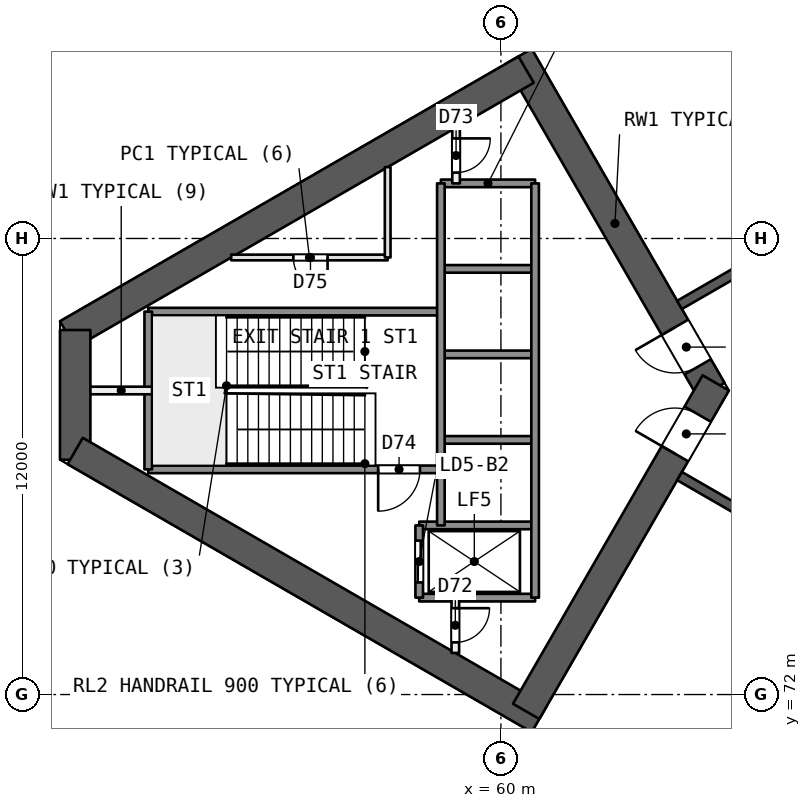
"""IFC4 building model, lengths in metres.
Left out: names, types, materials, properties, quantities, classifications, styles, units other than length and angle.
Written with IfcOpenShell. Run it as: python <this file> out.ifc"""

import sys

from ifc_helpers import new_model, si_unit, direction, frame, frame_2d, origin, place, context, subcontext, project, spatial, rectangle, extrude, element, fill, save


model = new_model("IFC4")
c1 = context("Model", 3, precision=1e-05, world=origin(), true_north=direction((0.0, 1.0)))
c2 = subcontext(c1, "Body", "Model", "MODEL_VIEW")
j1 = project(units=[si_unit("LENGTHUNIT", "METRE"), si_unit("PLANEANGLEUNIT", "RADIAN")], contexts=[c1])
p1 = place(None, origin())
s1 = spatial("IfcSite", under=j1, at=p1, CompositionType="ELEMENT")
p2 = place(p1, origin())
s2 = spatial("IfcBuilding", under=s1, at=p2, CompositionType="ELEMENT")
p3 = place(p2, frame((0.0, 0.0, -9.0)))
s3 = spatial("IfcBuildingStorey", under=s2, at=p3, CompositionType="ELEMENT", Elevation=-9.0)
p4 = place(p3, frame((94.84, 122.4, -0.3), z_axis=(0.0, 0.0, 1.0), x_axis=(-0.866026157749, -0.499998694092, 0.0)))
e1 = element("IfcWall", 1, at=p4, inside=s3, PredefinedType="SOLIDWALL", context=c2, shape_type="SweptSolid", body=[
    extrude(rectangle(XDim=76.937, YDim=0.6, at=frame_2d((38.469, 0.0))), origin(), (0.0, 0.0, 1.0), 4.8),
])
p5 = place(p3, frame((28.36, 75.981, -0.3), z_axis=(0.0, 0.0, 1.0), x_axis=(0.866025364439, -0.500000068148, 0.0)))
e2 = element("IfcWall", 2, at=p5, inside=s3, PredefinedType="SOLIDWALL", context=c2, shape_type="SweptSolid", body=[
    extrude(rectangle(XDim=76.937, YDim=0.6, at=frame_2d((38.469, 0.0))), origin(), (0.0, 0.0, 1.0), 4.8),
])
p6 = place(p3, frame((65.538, 80.0, -0.3), z_axis=(0.0, 0.0, 1.0), x_axis=(-0.49999662545, 0.866027352073, 0.0)))
e3 = element("IfcWall", 3, at=p6, inside=s3, PredefinedType="SHEAR", context=c2, shape_type="SweptSolid", body=[
    extrude(rectangle(XDim=10.149, YDim=0.8, at=frame_2d((5.074, 0.0))), origin(), (0.0, 0.0, 1.0), 4.8),
])
p7 = place(p6, frame((0.719, 0.0, 0.3)))
e4 = element("IfcOpeningElement", 4, at=p7, cuts=e3, PredefinedType="OPENING", context=c2, shape_type="SweptSolid", body=[
    extrude(rectangle(XDim=1.2, YDim=2.1, at=frame_2d((0.6, 1.05))), frame((0.0, 0.411, 0.0), z_axis=(0.0, -1.0, 0.0), x_axis=(1.0, 0.0, 0.0)), (0.0, 0.0, 1.0), 0.821),
])
p8 = place(p3, frame((60.664, 88.443, -0.3), z_axis=(0.0, 0.0, 1.0), x_axis=(-0.866029478545, -0.499992942241, 0.0)))
e5 = element("IfcWall", 5, at=p8, inside=s3, PredefinedType="SHEAR", context=c2, shape_type="SweptSolid", body=[
    extrude(rectangle(XDim=13.933, YDim=0.8, at=frame_2d((6.967, 0.0))), origin(), (0.0, 0.0, 1.0), 4.8),
])
p9 = place(p3, frame((48.797, 81.592, -0.3), z_axis=(0.0, 0.0, 1.0), x_axis=(0.0, -1.0, 0.0)))
e6 = element("IfcWall", 6, at=p9, inside=s3, PredefinedType="SHEAR", context=c2, shape_type="SweptSolid", body=[
    extrude(rectangle(XDim=3.415, YDim=0.8, at=frame_2d((1.707, 0.0))), origin(), (0.0, 0.0, 1.0), 4.8),
])
p10 = place(p3, frame((48.797, 78.408, -0.3), z_axis=(0.0, 0.0, 1.0), x_axis=(0.866032504327, -0.499987701298, 0.0)))
e7 = element("IfcWall", 7, at=p10, inside=s3, PredefinedType="SHEAR", context=c2, shape_type="SweptSolid", body=[
    extrude(rectangle(XDim=14.102, YDim=0.8, at=frame_2d((7.051, 0.0))), origin(), (0.0, 0.0, 1.0), 4.8),
])
p11 = place(p3, frame((60.664, 71.557, -0.3), z_axis=(0.0, 0.0, 1.0), x_axis=(0.50000409368, 0.866023040284, 0.0)))
e8 = element("IfcWall", 8, at=p11, inside=s3, PredefinedType="SHEAR", context=c2, shape_type="SweptSolid", body=[
    extrude(rectangle(XDim=9.98, YDim=0.8, at=frame_2d((4.99, 0.0))), origin(), (0.0, 0.0, 1.0), 4.8),
])
p12 = place(p11, frame((7.83, 0.0, 0.3)))
e9 = element("IfcOpeningElement", 9, at=p12, cuts=e8, PredefinedType="OPENING", context=c2, shape_type="SweptSolid", body=[
    extrude(rectangle(XDim=1.2, YDim=2.1, at=frame_2d((0.6, 1.05))), frame((0.0, 0.411, 0.0), z_axis=(0.0, -1.0, 0.0), x_axis=(1.0, 0.0, 0.0)), (0.0, 0.0, 1.0), 0.821),
])
for number, where, z_axis, x_axis in (
    (10, (78.2, 90.046, -0.3), (0.0, 0.0, 1.0), (-0.866, -0.5, 0.0)),
    (11, (64.7, 77.748, -0.3), (0.0, 0.0, 1.0), (0.866, -0.5, 0.0)),
):
    element("IfcWall", number, at=place(p3, frame(where, z_axis=z_axis, x_axis=x_axis)), inside=s3, PredefinedType="SHEAR", context=c2, shape_type="SweptSolid", body=[
        extrude(rectangle(XDim=15.588, YDim=0.25, at=frame_2d((7.794, 0.0))), origin(), (0.0, 0.0, 1.0), 4.5),
    ])
p13 = place(p3, frame((60.9, 85.45, 0.0), z_axis=(0.0, 0.0, 1.0), x_axis=(-1.0, 0.0, 0.0)))
e12 = element("IfcWall", 12, at=p13, inside=s3, PredefinedType="SOLIDWALL", context=c2, shape_type="SweptSolid", body=[
    extrude(rectangle(XDim=2.48, YDim=0.2, at=frame_2d((1.24, 0.0))), origin(), (0.0, 0.0, 1.0), 4.2),
])
p14 = place(p3, frame((57.02, 83.5, 0.0), z_axis=(0.0, 0.0, 1.0), x_axis=(-1.0, 0.0, 0.0)))
e13 = element("IfcWall", 13, at=p14, inside=s3, PredefinedType="PARTITIONING", context=c2, shape_type="SweptSolid", body=[
    extrude(rectangle(XDim=4.118, YDim=0.15, at=frame_2d((2.059, 0.0))), origin(), (0.0, 0.0, 1.0), 4.2),
])
p15 = place(p14, frame((1.582, 0.0, 0.0)))
e14 = element("IfcOpeningElement", 14, at=p15, cuts=e13, PredefinedType="OPENING", context=c2, shape_type="SweptSolid", body=[
    extrude(rectangle(XDim=0.9, YDim=2.1, at=frame_2d((0.45, 1.05))), frame((0.0, 0.085, 0.0), z_axis=(0.0, -1.0, 0.0), x_axis=(1.0, 0.0, 0.0)), (0.0, 0.0, 1.0), 0.171),
])
p16 = place(p3, frame((60.9, 83.2, 0.0), z_axis=(0.0, 0.0, 1.0), x_axis=(-1.0, 0.0, 0.0)))
e15 = element("IfcWall", 15, at=p16, inside=s3, PredefinedType="SOLIDWALL", context=c2, shape_type="SweptSolid", body=[
    extrude(rectangle(XDim=2.48, YDim=0.2, at=frame_2d((1.24, 0.0))), origin(), (0.0, 0.0, 1.0), 4.2),
])
p17 = place(p3, frame((58.42, 82.075, 0.0), z_axis=(0.0, 0.0, 1.0), x_axis=(-1.0, 0.0, 0.0)))
e16 = element("IfcWall", 16, at=p17, inside=s3, PredefinedType="SOLIDWALL", context=c2, shape_type="SweptSolid", body=[
    extrude(rectangle(XDim=7.7, YDim=0.2, at=frame_2d((3.85, 0.0))), origin(), (0.0, 0.0, 1.0), 4.2),
])
p18 = place(p3, frame((60.9, 80.95, 0.0), z_axis=(0.0, 0.0, 1.0), x_axis=(-1.0, 0.0, 0.0)))
e17 = element("IfcWall", 17, at=p18, inside=s3, PredefinedType="SOLIDWALL", context=c2, shape_type="SweptSolid", body=[
    extrude(rectangle(XDim=2.48, YDim=0.2, at=frame_2d((1.24, 0.0))), origin(), (0.0, 0.0, 1.0), 4.2),
])
p19 = place(p3, frame((50.82, 80.0, 0.0), z_axis=(0.0, 0.0, 1.0), x_axis=(-1.0, 0.0, 0.0)))
e18 = element("IfcWall", 18, at=p19, inside=s3, PredefinedType="PARTITIONING", context=c2, shape_type="SweptSolid", body=[
    extrude(rectangle(XDim=1.623, YDim=0.2, at=frame_2d((0.812, 0.0))), origin(), (0.0, 0.0, 1.0), 4.2),
])
p20 = place(p3, frame((60.9, 78.7, 0.0), z_axis=(0.0, 0.0, 1.0), x_axis=(-1.0, 0.0, 0.0)))
e19 = element("IfcWall", 19, at=p20, inside=s3, PredefinedType="SOLIDWALL", context=c2, shape_type="SweptSolid", body=[
    extrude(rectangle(XDim=2.48, YDim=0.2, at=frame_2d((1.24, 0.0))), origin(), (0.0, 0.0, 1.0), 4.2),
])
p21 = place(p3, frame((58.42, 77.925, 0.0), z_axis=(0.0, 0.0, 1.0), x_axis=(-1.0, 0.0, 0.0)))
e20 = element("IfcWall", 20, at=p21, inside=s3, PredefinedType="SOLIDWALL", context=c2, shape_type="SweptSolid", body=[
    extrude(rectangle(XDim=7.7, YDim=0.2, at=frame_2d((3.85, 0.0))), origin(), (0.0, 0.0, 1.0), 4.2),
])
p22 = place(p21, frame((0.55, 0.0, 0.0)))
e21 = element("IfcOpeningElement", 21, at=p22, cuts=e20, PredefinedType="OPENING", context=c2, shape_type="SweptSolid", body=[
    extrude(rectangle(XDim=1.1, YDim=2.1, at=frame_2d((0.55, 1.05))), frame((0.0, 0.11, 0.0), z_axis=(0.0, -1.0, 0.0), x_axis=(1.0, 0.0, 0.0)), (0.0, 0.0, 1.0), 0.221),
])
for number, where, z_axis, x_axis in (
    (22, (60.9, 76.45, 0.0), (0.0, 0.0, 1.0), (-1.0, 0.0, 0.0)),
    (23, (60.9, 74.55, 0.0), (0.0, 0.0, 1.0), (-1.0, 0.0, 0.0)),
):
    element("IfcWall", number, at=place(p3, frame(where, z_axis=z_axis, x_axis=x_axis)), inside=s3, PredefinedType="SOLIDWALL", context=c2, shape_type="SweptSolid", body=[
        extrude(rectangle(XDim=3.05, YDim=0.2, at=frame_2d((1.525, 0.0))), origin(), (0.0, 0.0, 1.0), 4.2),
    ])
p23 = place(p3, frame((60.9, 85.45, 0.0), z_axis=(0.0, 0.0, 1.0), x_axis=(0.0, -1.0, 0.0)))
e24 = element("IfcWall", 24, at=p23, inside=s3, PredefinedType="SOLIDWALL", context=c2, shape_type="SweptSolid", body=[
    extrude(rectangle(XDim=10.9, YDim=0.2, at=frame_2d((5.45, 0.0))), origin(), (0.0, 0.0, 1.0), 4.2),
])
p24 = place(p3, frame((58.82, 86.917, 0.0), z_axis=(0.0, 0.0, 1.0), x_axis=(0.0, -1.0, 0.0)))
e25 = element("IfcWall", 25, at=p24, inside=s3, PredefinedType="PARTITIONING", context=c2, shape_type="SweptSolid", body=[
    extrude(rectangle(XDim=1.467, YDim=0.2, at=frame_2d((0.733, 0.0))), origin(), (0.0, 0.0, 1.0), 4.2),
])
p25 = place(p24, frame((0.283, 0.0, 0.0)))
e26 = element("IfcOpeningElement", 26, at=p25, cuts=e25, PredefinedType="OPENING", context=c2, shape_type="SweptSolid", body=[
    extrude(rectangle(XDim=0.9, YDim=2.1, at=frame_2d((0.45, 1.05))), frame((0.0, 0.11, 0.0), z_axis=(0.0, -1.0, 0.0), x_axis=(1.0, 0.0, 0.0)), (0.0, 0.0, 1.0), 0.221),
])
p26 = place(p3, frame((58.8, 74.55, 0.0), z_axis=(0.0, 0.0, 1.0), x_axis=(0.0, -1.0, 0.0)))
e27 = element("IfcWall", 27, at=p26, inside=s3, PredefinedType="PARTITIONING", context=c2, shape_type="SweptSolid", body=[
    extrude(rectangle(XDim=1.455, YDim=0.2, at=frame_2d((0.728, 0.0))), origin(), (0.0, 0.0, 1.0), 4.2),
])
p27 = place(p26, frame((0.278, 0.0, 0.0)))
e28 = element("IfcOpeningElement", 28, at=p27, cuts=e27, PredefinedType="OPENING", context=c2, shape_type="SweptSolid", body=[
    extrude(rectangle(XDim=0.9, YDim=2.1, at=frame_2d((0.45, 1.05))), frame((0.0, 0.11, 0.0), z_axis=(0.0, -1.0, 0.0), x_axis=(1.0, 0.0, 0.0)), (0.0, 0.0, 1.0), 0.221),
])
p28 = place(p3, frame((58.42, 85.45, 0.0), z_axis=(0.0, 0.0, 1.0), x_axis=(0.0, -1.0, 0.0)))
e29 = element("IfcWall", 29, at=p28, inside=s3, PredefinedType="SOLIDWALL", context=c2, shape_type="SweptSolid", body=[
    extrude(rectangle(XDim=9.0, YDim=0.2, at=frame_2d((4.5, 0.0))), origin(), (0.0, 0.0, 1.0), 4.2),
])
p29 = place(p3, frame((57.85, 76.45, 0.0), z_axis=(0.0, 0.0, 1.0), x_axis=(0.0, -1.0, 0.0)))
e30 = element("IfcWall", 30, at=p29, inside=s3, PredefinedType="SOLIDWALL", context=c2, shape_type="SweptSolid", body=[
    extrude(rectangle(XDim=1.9, YDim=0.2, at=frame_2d((0.95, 0.0))), origin(), (0.0, 0.0, 1.0), 4.2),
])
p30 = place(p29, frame((0.4, 0.0, 0.0)))
e31 = element("IfcOpeningElement", 31, at=p30, cuts=e30, PredefinedType="OPENING", context=c2, shape_type="SweptSolid", body=[
    extrude(rectangle(XDim=1.1, YDim=2.1, at=frame_2d((0.55, 1.05))), frame((0.0, 0.11, 0.0), z_axis=(0.0, -1.0, 0.0), x_axis=(1.0, 0.0, 0.0)), (0.0, 0.0, 1.0), 0.221),
])
p31 = place(p3, frame((57.02, 85.877, 0.0), z_axis=(0.0, 0.0, 1.0), x_axis=(0.0, -1.0, 0.0)))
e32 = element("IfcWall", 32, at=p31, inside=s3, PredefinedType="PARTITIONING", context=c2, shape_type="SweptSolid", body=[
    extrude(rectangle(XDim=2.377, YDim=0.15, at=frame_2d((1.189, 0.0))), origin(), (0.0, 0.0, 1.0), 4.2),
])
p32 = place(p3, frame((50.72, 82.075, 0.0), z_axis=(0.0, 0.0, 1.0), x_axis=(0.0, -1.0, 0.0)))
e33 = element("IfcWall", 33, at=p32, inside=s3, PredefinedType="SOLIDWALL", context=c2, shape_type="SweptSolid", body=[
    extrude(rectangle(XDim=4.15, YDim=0.2, at=frame_2d((2.075, 0.0))), origin(), (0.0, 0.0, 1.0), 4.2),
])
p33 = place(p7, origin())
e34 = element("IfcDoor", 34, at=p33, inside=s3, OperationType="SINGLE_SWING_RIGHT", PredefinedType="NOTDEFINED", context=c2, shape_type="SweptSolid", body=[
    extrude(rectangle(XDim=1.2, YDim=2.1, at=frame_2d((0.6, 1.05))), frame((0.0, 0.025, 0.0), z_axis=(0.0, -1.0, 0.0), x_axis=(1.0, 0.0, 0.0)), (0.0, 0.0, 1.0), 0.05),
])
fill(e4, e34)
p34 = place(p12, origin())
e35 = element("IfcDoor", 35, at=p34, inside=s3, OperationType="SINGLE_SWING_LEFT", PredefinedType="NOTDEFINED", context=c2, shape_type="SweptSolid", body=[
    extrude(rectangle(XDim=1.2, YDim=2.1, at=frame_2d((0.6, 1.05))), frame((0.0, 0.025, 0.0), z_axis=(0.0, -1.0, 0.0), x_axis=(1.0, 0.0, 0.0)), (0.0, 0.0, 1.0), 0.05),
])
fill(e9, e35)
p35 = place(p30, origin())
e36 = element("IfcDoor", 36, at=p35, inside=s3, OperationType="SLIDING_TO_RIGHT", PredefinedType="NOTDEFINED", context=c2, shape_type="SweptSolid", body=[
    extrude(rectangle(XDim=1.1, YDim=2.1, at=frame_2d((0.55, 1.05))), frame((0.0, 0.025, 0.0), z_axis=(0.0, -1.0, 0.0), x_axis=(1.0, 0.0, 0.0)), (0.0, 0.0, 1.0), 0.05),
])
fill(e31, e36)
p36 = place(p27, origin())
e37 = element("IfcDoor", 37, at=p36, inside=s3, OperationType="SINGLE_SWING_LEFT", PredefinedType="NOTDEFINED", context=c2, shape_type="SweptSolid", body=[
    extrude(rectangle(XDim=0.9, YDim=2.1, at=frame_2d((0.45, 1.05))), frame((0.0, 0.025, 0.0), z_axis=(0.0, -1.0, 0.0), x_axis=(1.0, 0.0, 0.0)), (0.0, 0.0, 1.0), 0.05),
])
fill(e28, e37)
p37 = place(p25, origin())
e38 = element("IfcDoor", 38, at=p37, inside=s3, OperationType="SINGLE_SWING_LEFT", PredefinedType="NOTDEFINED", context=c2, shape_type="SweptSolid", body=[
    extrude(rectangle(XDim=0.9, YDim=2.1, at=frame_2d((0.45, 1.05))), frame((0.0, 0.025, 0.0), z_axis=(0.0, -1.0, 0.0), x_axis=(1.0, 0.0, 0.0)), (0.0, 0.0, 1.0), 0.05),
])
fill(e26, e38)
p38 = place(p22, origin())
e39 = element("IfcDoor", 39, at=p38, inside=s3, OperationType="SINGLE_SWING_RIGHT", PredefinedType="NOTDEFINED", context=c2, shape_type="SweptSolid", body=[
    extrude(rectangle(XDim=1.1, YDim=2.1, at=frame_2d((0.55, 1.05))), frame((0.0, 0.025, 0.0), z_axis=(0.0, -1.0, 0.0), x_axis=(1.0, 0.0, 0.0)), (0.0, 0.0, 1.0), 0.05),
])
fill(e21, e39)
p39 = place(p15, origin())
e40 = element("IfcDoor", 40, at=p39, inside=s3, OperationType="SINGLE_SWING_LEFT", PredefinedType="NOTDEFINED", context=c2, shape_type="SweptSolid", body=[
    extrude(rectangle(XDim=0.9, YDim=2.1, at=frame_2d((0.45, 1.05))), frame((0.0, 0.025, 0.0), z_axis=(0.0, -1.0, 0.0), x_axis=(1.0, 0.0, 0.0)), (0.0, 0.0, 1.0), 0.05),
])
fill(e14, e40)
save(model, sys.argv[1])
